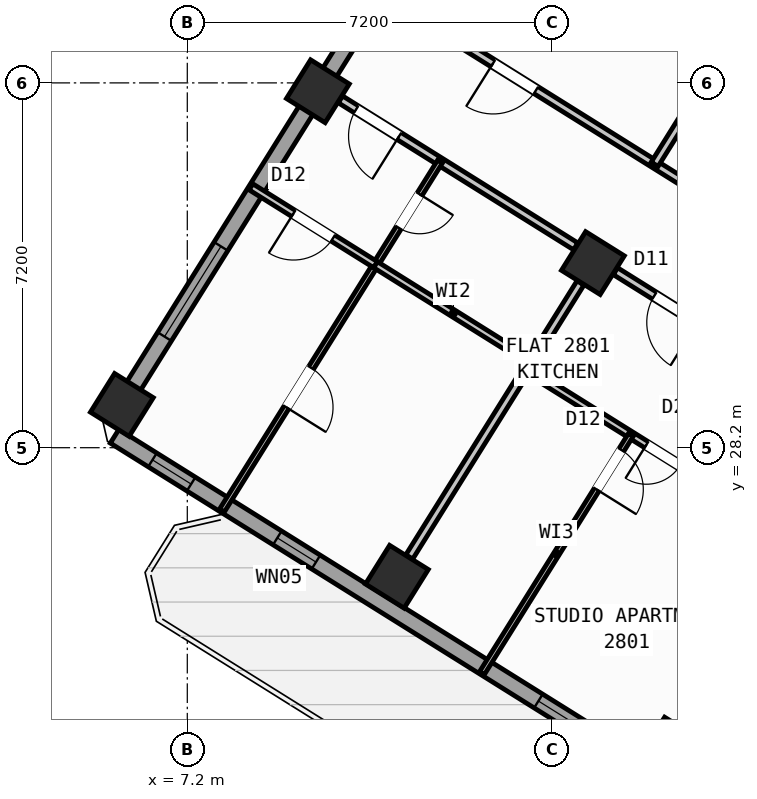
"""IFC4 building model, lengths in metres.
Left out: names, types, materials, properties, quantities, classifications, styles, units other than length and angle.
Written with IfcOpenShell. Run it as: python <this file> out.ifc"""

import sys

from ifc_helpers import new_model, si_unit, direction, frame, frame_2d, origin, origin_2d, place, context, subcontext, project, spatial, rectangle, hollow_rectangle, extrude, source, transform, mapped, element, fill, save


model = new_model("IFC4")
c1 = context("Model", 3, precision=1e-05, world=origin(), true_north=direction((0.0, 1.0)))
c2 = subcontext(c1, "Body", "Model", "MODEL_VIEW")
j1 = project(units=[si_unit("LENGTHUNIT", "METRE"), si_unit("PLANEANGLEUNIT", "RADIAN")], contexts=[c1])
p1 = place(None, origin())
s1 = spatial("IfcSite", under=j1, at=p1, CompositionType="ELEMENT")
p2 = place(p1, origin())
s2 = spatial("IfcBuilding", under=s1, at=p2, CompositionType="ELEMENT")
p3 = place(p2, frame((0.0, 0.0, 112.5)))
s3 = spatial("IfcBuildingStorey", under=s2, at=p3, CompositionType="ELEMENT", Elevation=112.5)
m1 = source(origin(), c2, "Body", "SweptSolid", [
    extrude(hollow_rectangle(XDim=0.9, YDim=0.9, WallThickness=0.036, at=origin_2d()), origin(), (0.0, 0.0, 1.0), 3.6),
])
for number, where, z_axis, x_axis in (
    (1, (16.764, 22.261, 0.0), (0.0, 0.0, 1.0), (-0.848, 0.53, 0.0)),
    (2, (15.205, 31.844, 0.0), (0.0, 0.0, 1.0), (-0.848, 0.53, 0.0)),
    (3, (11.336, 25.653, 0.0), (0.0, 0.0, 1.0), (-0.848, 0.53, 0.0)),
    (4, (9.777, 35.235, 0.0), (0.0, 0.0, 1.0), (-0.848, 0.53, 0.0)),
    (5, (5.909, 29.044, 0.0), (0.0, 0.0, 1.0), (-0.848, 0.53, 0.0)),
):
    element("IfcColumn", number, at=place(p3, frame(where, z_axis=z_axis, x_axis=x_axis)), inside=s3, PredefinedType="COLUMN", context=c2, shape_type="MappedRepresentation", body=[
        mapped(m1, transform((0.0, 0.0, 0.0), scale=1.0)),
    ])
p4 = place(p3, frame((31.76, 12.183, 0.0), z_axis=(0.0, 0.0, 1.0), x_axis=(-0.848047074256, 0.529920899612, 0.0)))
e6 = element("IfcWall", 6, at=p4, inside=s3, PredefinedType="STANDARD", context=c2, shape_type="SweptSolid", body=[
    extrude(rectangle(XDim=30.652, YDim=0.32, at=frame_2d((15.326, 0.0))), origin(), (0.0, 0.0, 1.0), 3.35),
])
p5 = place(p4, frame((15.153, 0.0, 0.0)))
e7 = element("IfcOpeningElement", 7, at=p5, cuts=e6, PredefinedType="OPENING", context=c2, shape_type="SweptSolid", body=[
    extrude(rectangle(XDim=1.2, YDim=2.15, at=frame_2d((0.6, 1.075))), frame((0.0, 0.17, 0.0), z_axis=(0.0, -1.0, 0.0), x_axis=(1.0, 0.0, 0.0)), (0.0, 0.0, 1.0), 0.34),
])
p6 = place(p4, frame((2.002, 0.0, 0.8)))
e8 = element("IfcOpeningElement", 8, at=p6, cuts=e6, PredefinedType="OPENING", context=c2, shape_type="SweptSolid", body=[
    extrude(rectangle(XDim=2.1, YDim=1.55, at=frame_2d((1.05, 0.775))), frame((0.0, 0.17, 0.0), z_axis=(0.0, -1.0, 0.0), x_axis=(1.0, 0.0, 0.0)), (0.0, 0.0, 1.0), 0.34),
])
p7 = place(p4, frame((7.206, 0.0, 0.8)))
e9 = element("IfcOpeningElement", 9, at=p7, cuts=e6, PredefinedType="OPENING", context=c2, shape_type="SweptSolid", body=[
    extrude(rectangle(XDim=2.1, YDim=1.55, at=frame_2d((1.05, 0.775))), frame((0.0, 0.17, 0.0), z_axis=(0.0, -1.0, 0.0), x_axis=(1.0, 0.0, 0.0)), (0.0, 0.0, 1.0), 0.34),
])
p8 = place(p4, frame((12.648, 0.0, 1.0)))
e10 = element("IfcOpeningElement", 10, at=p8, cuts=e6, PredefinedType="OPENING", context=c2, shape_type="SweptSolid", body=[
    extrude(rectangle(XDim=0.9, YDim=1.25, at=frame_2d((0.45, 0.625))), frame((0.0, 0.17, 0.0), z_axis=(0.0, -1.0, 0.0), x_axis=(1.0, 0.0, 0.0)), (0.0, 0.0, 1.0), 0.34),
])
p9 = place(p4, frame((19.59, 0.0, 0.95)))
e11 = element("IfcOpeningElement", 11, at=p9, cuts=e6, PredefinedType="OPENING", context=c2, shape_type="SweptSolid", body=[
    extrude(rectangle(XDim=1.2, YDim=1.4, at=frame_2d((0.6, 0.7))), frame((0.0, 0.17, 0.0), z_axis=(0.0, -1.0, 0.0), x_axis=(1.0, 0.0, 0.0)), (0.0, 0.0, 1.0), 0.34),
])
p10 = place(p4, frame((25.966, 0.0, 1.0)))
e12 = element("IfcOpeningElement", 12, at=p10, cuts=e6, PredefinedType="OPENING", context=c2, shape_type="SweptSolid", body=[
    extrude(rectangle(XDim=0.9, YDim=1.25, at=frame_2d((0.45, 0.625))), frame((0.0, 0.17, 0.0), z_axis=(0.0, -1.0, 0.0), x_axis=(1.0, 0.0, 0.0)), (0.0, 0.0, 1.0), 0.34),
])
p11 = place(p4, frame((28.871, 0.0, 1.0)))
e13 = element("IfcOpeningElement", 13, at=p11, cuts=e6, PredefinedType="OPENING", context=c2, shape_type="SweptSolid", body=[
    extrude(rectangle(XDim=0.9, YDim=1.25, at=frame_2d((0.45, 0.625))), frame((0.0, 0.17, 0.0), z_axis=(0.0, -1.0, 0.0), x_axis=(1.0, 0.0, 0.0)), (0.0, 0.0, 1.0), 0.34),
])
p12 = place(p3, frame((5.7, 28.71, 0.0), z_axis=(0.0, 0.0, 1.0), x_axis=(0.529923711467, 0.8480453172, 0.0)))
e14 = element("IfcWall", 14, at=p12, inside=s3, PredefinedType="STANDARD", context=c2, shape_type="SweptSolid", body=[
    extrude(rectangle(XDim=21.587, YDim=0.32, at=frame_2d((10.794, 0.0))), origin(), (0.0, 0.0, 1.0), 2.775),
])
p13 = place(p12, frame((1.984, 0.0, 0.8)))
e15 = element("IfcOpeningElement", 15, at=p13, cuts=e14, PredefinedType="OPENING", context=c2, shape_type="SweptSolid", body=[
    extrude(rectangle(XDim=2.1, YDim=1.55, at=frame_2d((1.05, 0.775))), frame((0.0, 0.17, 0.0), z_axis=(0.0, -1.0, 0.0), x_axis=(1.0, 0.0, 0.0)), (0.0, 0.0, 1.0), 0.34),
])
p14 = place(p12, frame((11.459, 0.0, 0.85)))
e16 = element("IfcOpeningElement", 16, at=p14, cuts=e14, PredefinedType="OPENING", context=c2, shape_type="SweptSolid", body=[
    extrude(rectangle(XDim=1.8, YDim=1.5, at=frame_2d((0.9, 0.75))), frame((0.0, 0.17, 0.0), z_axis=(0.0, -1.0, 0.0), x_axis=(1.0, 0.0, 0.0)), (0.0, 0.0, 1.0), 0.34),
])
p15 = place(p12, frame((18.335, 0.0, 0.85)))
e17 = element("IfcOpeningElement", 17, at=p15, cuts=e14, PredefinedType="OPENING", context=c2, shape_type="SweptSolid", body=[
    extrude(rectangle(XDim=1.5, YDim=1.5, at=frame_2d((0.75, 0.75))), frame((0.0, 0.17, 0.0), z_axis=(0.0, -1.0, 0.0), x_axis=(1.0, 0.0, 0.0)), (0.0, 0.0, 1.0), 0.34),
])
p16 = place(p3, frame((25.065, 28.394, 0.0), z_axis=(0.0, 0.0, 1.0), x_axis=(-0.848048310262, 0.529918921593, 0.0)))
e18 = element("IfcWall", 18, at=p16, inside=s3, PredefinedType="PARTITIONING", context=c2, shape_type="SweptSolid", body=[
    extrude(rectangle(XDim=16.73, YDim=0.16, at=frame_2d((8.365, 0.0))), origin(), (0.0, 0.0, 1.0), 3.34),
])
p17 = place(p16, frame((2.22, 0.0, 0.0)))
e19 = element("IfcOpeningElement", 19, at=p17, cuts=e18, PredefinedType="OPENING", context=c2, shape_type="SweptSolid", body=[
    extrude(rectangle(XDim=0.86, YDim=2.05, at=frame_2d((0.43, 1.025))), frame((0.0, 0.09, 0.0), z_axis=(0.0, -1.0, 0.0), x_axis=(1.0, 0.0, 0.0)), (0.0, 0.0, 1.0), 0.18),
])
p18 = place(p16, frame((7.82, 0.0, 0.0)))
e20 = element("IfcOpeningElement", 20, at=p18, cuts=e18, PredefinedType="OPENING", context=c2, shape_type="SweptSolid", body=[
    extrude(rectangle(XDim=1.0, YDim=2.1, at=frame_2d((0.5, 1.05))), frame((0.0, 0.09, 0.0), z_axis=(0.0, -1.0, 0.0), x_axis=(1.0, 0.0, 0.0)), (0.0, 0.0, 1.0), 0.18),
])
p19 = place(p16, frame((12.95, 0.0, 0.0)))
e21 = element("IfcOpeningElement", 21, at=p19, cuts=e18, PredefinedType="OPENING", context=c2, shape_type="SweptSolid", body=[
    extrude(rectangle(XDim=1.0, YDim=2.1, at=frame_2d((0.5, 1.05))), frame((0.0, 0.09, 0.0), z_axis=(0.0, -1.0, 0.0), x_axis=(1.0, 0.0, 0.0)), (0.0, 0.0, 1.0), 0.18),
])
p20 = place(p3, frame((20.293, 28.782, 0.0), z_axis=(0.0, 0.0, 1.0), x_axis=(-0.848040881926, 0.529930809241, 0.0)))
e22 = element("IfcWall", 22, at=p20, inside=s3, PredefinedType="PARTITIONING", context=c2, shape_type="SweptSolid", body=[
    extrude(rectangle(XDim=5.476, YDim=0.16, at=frame_2d((2.738, 0.0))), origin(), (0.0, 0.0, 1.0), 2.775),
])
p21 = place(p20, frame((3.568, 0.0, 0.0)))
e23 = element("IfcOpeningElement", 23, at=p21, cuts=e22, PredefinedType="OPENING", context=c2, shape_type="SweptSolid", body=[
    extrude(rectangle(XDim=1.0, YDim=2.1, at=frame_2d((0.5, 1.05))), frame((0.0, 0.09, 0.0), z_axis=(0.0, -1.0, 0.0), x_axis=(1.0, 0.0, 0.0)), (0.0, 0.0, 1.0), 0.18),
])
p22 = place(p3, frame((14.866, 32.173, 0.0), z_axis=(0.0, 0.0, 1.0), x_axis=(-0.848053401719, 0.529910773464, 0.0)))
e24 = element("IfcWall", 24, at=p22, inside=s3, PredefinedType="PARTITIONING", context=c2, shape_type="SweptSolid", body=[
    extrude(rectangle(XDim=5.476, YDim=0.16, at=frame_2d((2.738, 0.0))), origin(), (0.0, 0.0, 1.0), 2.775),
])
p23 = place(p22, frame((4.108, 0.0, 0.0)))
e25 = element("IfcOpeningElement", 25, at=p23, cuts=e24, PredefinedType="OPENING", context=c2, shape_type="SweptSolid", body=[
    extrude(rectangle(XDim=1.0, YDim=2.1, at=frame_2d((0.5, 1.05))), frame((0.0, 0.09, 0.0), z_axis=(0.0, -1.0, 0.0), x_axis=(1.0, 0.0, 0.0)), (0.0, 0.0, 1.0), 0.18),
])
p24 = place(p3, frame((14.96, 31.452, 0.0), z_axis=(0.0, 0.0, 1.0), x_axis=(-0.529947310719, -0.848030570122, 0.0)))
e26 = element("IfcWall", 26, at=p24, inside=s3, PredefinedType="PARTITIONING", context=c2, shape_type="SweptSolid", body=[
    extrude(rectangle(XDim=6.376, YDim=0.16, at=frame_2d((3.188, 0.0))), origin(), (0.0, 0.0, 1.0), 2.775),
])
p25 = place(p3, frame((19.318, 26.349, 0.0), z_axis=(0.0, 0.0, 1.0), x_axis=(-0.848039019877, 0.529933789039, 0.0)))
e27 = element("IfcWall", 27, at=p25, inside=s3, PredefinedType="PLUMBINGWALL", context=c2, shape_type="SweptSolid", body=[
    extrude(rectangle(XDim=6.4, YDim=0.14, at=frame_2d((3.2, 0.0))), origin(), (0.0, 0.0, 1.0), 3.34),
])
p26 = place(p25, frame((2.824, 0.0, 0.0)))
e28 = element("IfcOpeningElement", 28, at=p26, cuts=e27, PredefinedType="OPENING", context=c2, shape_type="SweptSolid", body=[
    extrude(rectangle(XDim=0.78, YDim=2.05, at=frame_2d((0.39, 1.025))), frame((0.0, 0.08, 0.0), z_axis=(0.0, -1.0, 0.0), x_axis=(1.0, 0.0, 0.0)), (0.0, 0.0, 1.0), 0.16),
])
p27 = place(p3, frame((15.953, 28.452, 0.0), z_axis=(0.0, 0.0, 1.0), x_axis=(-0.529919714018, -0.848047815099, 0.0)))
e29 = element("IfcWall", 29, at=p27, inside=s3, PredefinedType="PARTITIONING", context=c2, shape_type="SweptSolid", body=[
    extrude(rectangle(XDim=5.54, YDim=0.11, at=frame_2d((2.77, 0.0))), origin(), (0.0, 0.0, 1.0), 3.34),
])
p28 = place(p27, frame((0.35, 0.0, 0.0)))
e30 = element("IfcOpeningElement", 30, at=p28, cuts=e29, PredefinedType="OPENING", context=c2, shape_type="SweptSolid", body=[
    extrude(rectangle(XDim=0.92, YDim=2.08, at=frame_2d((0.46, 1.04))), frame((0.0, 0.065, 0.0), z_axis=(0.0, -1.0, 0.0), x_axis=(1.0, 0.0, 0.0)), (0.0, 0.0, 1.0), 0.13),
])
p29 = place(p3, frame((12.188, 33.847, 0.0), z_axis=(0.0, 0.0, 1.0), x_axis=(-0.529917860021, -0.848048973604, 0.0)))
e31 = element("IfcWall", 31, at=p29, inside=s3, PredefinedType="PARTITIONING", context=c2, shape_type="SweptSolid", body=[
    extrude(rectangle(XDim=8.12, YDim=0.11, at=frame_2d((4.06, 0.0))), origin(), (0.0, 0.0, 1.0), 3.34),
])
p30 = place(p29, frame((0.76, 0.0, 0.0)))
e32 = element("IfcOpeningElement", 32, at=p30, cuts=e31, PredefinedType="OPENING", context=c2, shape_type="SweptSolid", body=[
    extrude(rectangle(XDim=0.78, YDim=2.05, at=frame_2d((0.39, 1.025))), frame((0.0, 0.065, 0.0), z_axis=(0.0, -1.0, 0.0), x_axis=(1.0, 0.0, 0.0)), (0.0, 0.0, 1.0), 0.13),
])
p31 = place(p29, frame((4.8, 0.0, 0.0)))
e33 = element("IfcOpeningElement", 33, at=p31, cuts=e31, PredefinedType="OPENING", context=c2, shape_type="SweptSolid", body=[
    extrude(rectangle(XDim=0.92, YDim=2.08, at=frame_2d((0.46, 1.04))), frame((0.0, 0.065, 0.0), z_axis=(0.0, -1.0, 0.0), x_axis=(1.0, 0.0, 0.0)), (0.0, 0.0, 1.0), 0.13),
])
p32 = place(p3, frame((10.916, 31.811, 0.0), z_axis=(0.0, 0.0, 1.0), x_axis=(-0.84802195137, 0.529961102341, 0.0)))
e34 = element("IfcWall", 34, at=p32, inside=s3, PredefinedType="PLUMBINGWALL", context=c2, shape_type="SweptSolid", body=[
    extrude(rectangle(XDim=2.9, YDim=0.14, at=frame_2d((1.45, 0.0))), origin(), (0.0, 0.0, 1.0), 3.34),
])
p33 = place(p32, frame((0.99, 0.0, 0.0)))
e35 = element("IfcOpeningElement", 35, at=p33, cuts=e34, PredefinedType="OPENING", context=c2, shape_type="SweptSolid", body=[
    extrude(rectangle(XDim=0.92, YDim=2.08, at=frame_2d((0.46, 1.04))), frame((0.0, 0.08, 0.0), z_axis=(0.0, -1.0, 0.0), x_axis=(1.0, 0.0, 0.0)), (0.0, 0.0, 1.0), 0.16),
])
p34 = place(p3, frame((13.986, 29.893, 0.0), z_axis=(0.0, 0.0, 1.0), x_axis=(-0.848051346257, 0.52991406295, 0.0)))
e36 = element("IfcWall", 36, at=p34, inside=s3, PredefinedType="PLUMBINGWALL", context=c2, shape_type="SweptSolid", body=[
    extrude(rectangle(XDim=3.62, YDim=0.14, at=frame_2d((1.81, 0.0))), origin(), (0.0, 0.0, 1.0), 3.34),
])
p35 = place(p3, frame((18.828, 37.643, 0.0), z_axis=(0.0, 0.0, 1.0), x_axis=(-0.529926399231, -0.848043637673, 0.0)))
e37 = element("IfcWall", 37, at=p35, inside=s3, PredefinedType="PARTITIONING", context=c2, shape_type="SweptSolid", body=[
    extrude(rectangle(XDim=4.538, YDim=0.16, at=frame_2d((2.269, 0.0))), origin(), (0.0, 0.0, 1.0), 2.775),
])
m2 = source(origin(), c2, "Body", "SweptSolid", [
    extrude(rectangle(XDim=1.2, YDim=1.4, at=frame_2d((0.6, 0.7))), frame((0.0, 0.03, 0.0), z_axis=(0.0, -1.0, 0.0), x_axis=(1.0, 0.0, 0.0)), (0.0, 0.0, 1.0), 0.06),
])
p36 = place(p9, origin())
e38 = element("IfcWindow", 38, at=p36, inside=s3, PartitioningType="SINGLE_PANEL", PredefinedType="WINDOW", context=c2, shape_type="MappedRepresentation", body=[
    mapped(m2, transform((0.0, 0.0, 0.0), scale=1.0)),
])
fill(e11, e38)
m3 = source(origin(), c2, "Body", "SweptSolid", [
    extrude(rectangle(XDim=0.9, YDim=1.25, at=frame_2d((0.45, 0.625))), frame((0.0, 0.03, 0.0), z_axis=(0.0, -1.0, 0.0), x_axis=(1.0, 0.0, 0.0)), (0.0, 0.0, 1.0), 0.06),
])
p37 = place(p10, origin())
e39 = element("IfcWindow", 39, at=p37, inside=s3, PartitioningType="SINGLE_PANEL", PredefinedType="WINDOW", context=c2, shape_type="MappedRepresentation", body=[
    mapped(m3, transform((0.0, 0.0, 0.0), scale=1.0)),
])
fill(e12, e39)
p38 = place(p11, origin())
e40 = element("IfcWindow", 40, at=p38, inside=s3, PartitioningType="SINGLE_PANEL", PredefinedType="WINDOW", context=c2, shape_type="MappedRepresentation", body=[
    mapped(m3, transform((0.0, 0.0, 0.0), scale=1.0)),
])
fill(e13, e40)
m4 = source(origin(), c2, "Body", "SweptSolid", [
    extrude(rectangle(XDim=2.1, YDim=1.55, at=frame_2d((1.05, 0.775))), frame((0.0, 0.03, 0.0), z_axis=(0.0, -1.0, 0.0), x_axis=(1.0, 0.0, 0.0)), (0.0, 0.0, 1.0), 0.06),
])
p39 = place(p13, origin())
e41 = element("IfcWindow", 41, at=p39, inside=s3, PartitioningType="SINGLE_PANEL", PredefinedType="WINDOW", context=c2, shape_type="MappedRepresentation", body=[
    mapped(m4, transform((0.0, 0.0, 0.0), scale=1.0)),
])
fill(e15, e41)
m5 = source(origin(), c2, "Body", "SweptSolid", [
    extrude(rectangle(XDim=0.92, YDim=2.08, at=frame_2d((0.46, 1.04))), frame((0.0, 0.025, 0.0), z_axis=(0.0, -1.0, 0.0), x_axis=(1.0, 0.0, 0.0)), (0.0, 0.0, 1.0), 0.05),
])
p40 = place(p28, origin())
e42 = element("IfcDoor", 42, at=p40, inside=s3, OperationType="SINGLE_SWING_RIGHT", PredefinedType="DOOR", context=c2, shape_type="MappedRepresentation", body=[
    mapped(m5, transform((0.0, 0.0, 0.0), scale=1.0)),
])
fill(e30, e42)
m6 = source(origin(), c2, "Body", "SweptSolid", [
    extrude(rectangle(XDim=1.0, YDim=2.1, at=frame_2d((0.5, 1.05))), frame((0.0, 0.025, 0.0), z_axis=(0.0, -1.0, 0.0), x_axis=(1.0, 0.0, 0.0)), (0.0, 0.0, 1.0), 0.05),
])
p41 = place(p21, origin())
e43 = element("IfcDoor", 43, at=p41, inside=s3, OperationType="SINGLE_SWING_LEFT", PredefinedType="DOOR", context=c2, shape_type="MappedRepresentation", body=[
    mapped(m6, transform((0.0, 0.0, 0.0), scale=1.0)),
])
fill(e23, e43)
m7 = source(origin(), c2, "Body", "SweptSolid", [
    extrude(rectangle(XDim=0.78, YDim=2.05, at=frame_2d((0.39, 1.025))), frame((0.0, 0.025, 0.0), z_axis=(0.0, -1.0, 0.0), x_axis=(1.0, 0.0, 0.0)), (0.0, 0.0, 1.0), 0.05),
])
p42 = place(p26, origin())
e44 = element("IfcDoor", 44, at=p42, inside=s3, OperationType="SINGLE_SWING_RIGHT", PredefinedType="DOOR", context=c2, shape_type="MappedRepresentation", body=[
    mapped(m7, transform((0.0, 0.0, 0.0), scale=1.0)),
])
fill(e28, e44)
p43 = place(p23, origin())
e45 = element("IfcDoor", 45, at=p43, inside=s3, OperationType="SINGLE_SWING_LEFT", PredefinedType="DOOR", context=c2, shape_type="MappedRepresentation", body=[
    mapped(m6, transform((0.0, 0.0, 0.0), scale=1.0)),
])
fill(e25, e45)
p44 = place(p33, origin())
e46 = element("IfcDoor", 46, at=p44, inside=s3, OperationType="SINGLE_SWING_RIGHT", PredefinedType="DOOR", context=c2, shape_type="MappedRepresentation", body=[
    mapped(m5, transform((0.0, 0.0, 0.0), scale=1.0)),
])
fill(e35, e46)
p45 = place(p30, origin())
e47 = element("IfcDoor", 47, at=p45, inside=s3, OperationType="SINGLE_SWING_LEFT", PredefinedType="DOOR", context=c2, shape_type="MappedRepresentation", body=[
    mapped(m7, transform((0.0, 0.0, 0.0), scale=1.0)),
])
fill(e32, e47)
p46 = place(p31, origin())
e48 = element("IfcDoor", 48, at=p46, inside=s3, OperationType="SINGLE_SWING_RIGHT", PredefinedType="DOOR", context=c2, shape_type="MappedRepresentation", body=[
    mapped(m5, transform((0.0, 0.0, 0.0), scale=1.0)),
])
fill(e33, e48)
p47 = place(p19, origin())
e49 = element("IfcDoor", 49, at=p47, inside=s3, OperationType="SINGLE_SWING_RIGHT", PredefinedType="DOOR", context=c2, shape_type="MappedRepresentation", body=[
    mapped(m6, transform((0.0, 0.0, 0.0), scale=1.0)),
])
fill(e21, e49)
save(model, sys.argv[1])
